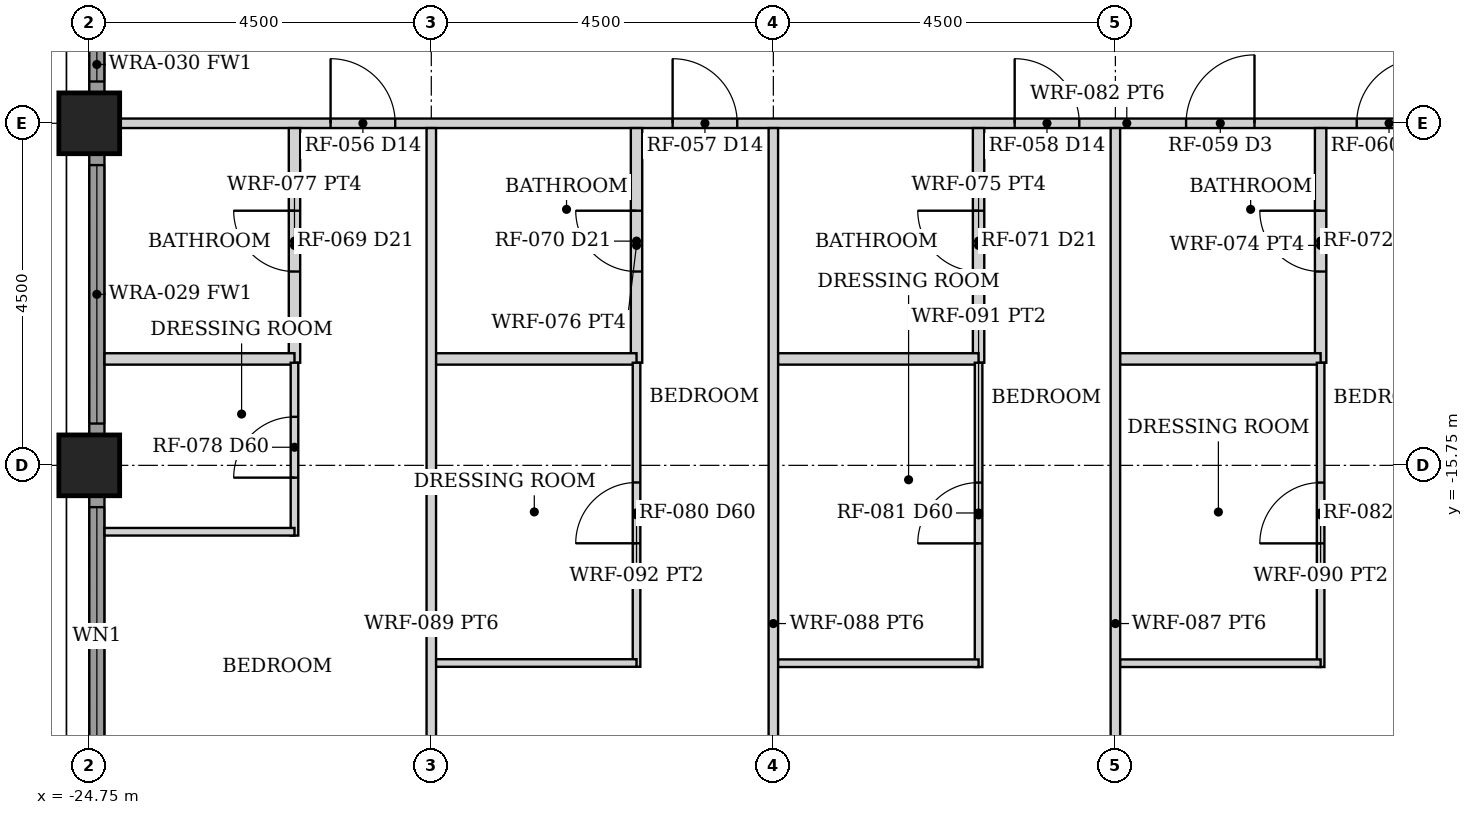
"""IFC4 building model, lengths in metres.
Left out: names, types, materials, properties, quantities, classifications, styles, units other than length and angle.
Written with IfcOpenShell. Run it as: python <this file> out.ifc"""

import sys

from ifc_helpers import new_model, si_unit, direction, frame, frame_2d, origin, origin_2d, place, context, subcontext, project, spatial, rectangle, hollow_rectangle, extrude, element, fill, save


model = new_model("IFC4")
c1 = context("Model", 3, precision=1e-05, world=origin(), true_north=direction((0.0, 1.0)))
c2 = subcontext(c1, "Body", "Model", "MODEL_VIEW")
j1 = project(units=[si_unit("LENGTHUNIT", "METRE"), si_unit("PLANEANGLEUNIT", "RADIAN")], contexts=[c1])
p1 = place(None, origin())
s1 = spatial("IfcSite", under=j1, at=p1, CompositionType="ELEMENT")
p2 = place(p1, origin())
s2 = spatial("IfcBuilding", under=s1, at=p2, CompositionType="ELEMENT")
p3 = place(p2, frame((0.0, 0.0, 79.0)))
s3 = spatial("IfcBuildingStorey", under=s2, at=p3, CompositionType="ELEMENT", Elevation=79.0)
for number, where, z_axis, x_axis in (
    (1, (-24.75, -15.75, 0.0), (0.0, 0.0, 1.0), (1.0, 0.0, 0.0)),
    (2, (-24.75, -11.25, 0.0), (0.0, 0.0, 1.0), (1.0, 0.0, 0.0)),
):
    element("IfcColumn", number, at=place(p3, frame(where, z_axis=z_axis, x_axis=x_axis)), inside=s3, PredefinedType="COLUMN", context=c2, shape_type="SweptSolid", body=[
        extrude(hollow_rectangle(XDim=0.8, YDim=0.8, WallThickness=0.06, at=origin_2d()), origin(), (0.0, 0.0, 1.0), 3.5),
    ])
p4 = place(p3, frame((-24.65, -19.845, 0.0), z_axis=(0.0, 0.0, 1.0), x_axis=(0.0, 1.0, 0.0)))
e3 = element("IfcWall", 3, at=p4, inside=s3, PredefinedType="SOLIDWALL", context=c2, shape_type="SweptSolid", body=[
    extrude(rectangle(XDim=3.69, YDim=0.2, at=frame_2d((1.845, 0.0))), origin(), (0.0, 0.0, 1.0), 2.379),
])
p5 = place(p4, frame((0.145, 0.0, 0.3)))
e4 = element("IfcOpeningElement", 4, at=p5, cuts=e3, PredefinedType="OPENING", context=c2, shape_type="SweptSolid", body=[
    extrude(rectangle(XDim=3.4, YDim=1.929, at=frame_2d((1.7, 0.964))), frame((0.0, 0.11, 0.0), z_axis=(0.0, -1.0, 0.0), x_axis=(1.0, 0.0, 0.0)), (0.0, 0.0, 1.0), 0.22),
])
p6 = place(p3, frame((-24.65, -15.345, 0.0), z_axis=(0.0, 0.0, 1.0), x_axis=(0.0, 1.0, 0.0)))
e5 = element("IfcWall", 5, at=p6, inside=s3, PredefinedType="SOLIDWALL", context=c2, shape_type="SweptSolid", body=[
    extrude(rectangle(XDim=3.69, YDim=0.2, at=frame_2d((1.845, 0.0))), origin(), (0.0, 0.0, 1.0), 2.379),
])
p7 = place(p6, frame((0.145, 0.0, 0.3)))
e6 = element("IfcOpeningElement", 6, at=p7, cuts=e5, PredefinedType="OPENING", context=c2, shape_type="SweptSolid", body=[
    extrude(rectangle(XDim=3.4, YDim=1.929, at=frame_2d((1.7, 0.964))), frame((0.0, 0.11, 0.0), z_axis=(0.0, -1.0, 0.0), x_axis=(1.0, 0.0, 0.0)), (0.0, 0.0, 1.0), 0.22),
])
p8 = place(p3, frame((-24.65, -10.845, 0.0), z_axis=(0.0, 0.0, 1.0), x_axis=(0.0, 1.0, 0.0)))
e7 = element("IfcWall", 7, at=p8, inside=s3, PredefinedType="SOLIDWALL", context=c2, shape_type="SweptSolid", body=[
    extrude(rectangle(XDim=3.69, YDim=0.2, at=frame_2d((1.845, 0.0))), origin(), (0.0, 0.0, 1.0), 2.379),
])
p9 = place(p8, frame((0.145, 0.0, 0.3)))
e8 = element("IfcOpeningElement", 8, at=p9, cuts=e7, PredefinedType="OPENING", context=c2, shape_type="SweptSolid", body=[
    extrude(rectangle(XDim=3.4, YDim=1.929, at=frame_2d((1.7, 0.964))), frame((0.0, 0.11, 0.0), z_axis=(0.0, -1.0, 0.0), x_axis=(1.0, 0.0, 0.0)), (0.0, 0.0, 1.0), 0.22),
])
p10 = place(p3, frame((-24.35, -11.25, 0.0), z_axis=(0.0, 0.0, 1.0), x_axis=(1.0, 0.0, 0.0)))
e9 = element("IfcWall", 9, at=p10, inside=s3, PredefinedType="PARTITIONING", context=c2, shape_type="SweptSolid", body=[
    extrude(rectangle(XDim=26.5, YDim=0.125, at=frame_2d((13.25, 0.0))), origin(), (0.0, 0.0, 1.0), 2.373),
])
p11 = place(p10, frame((24.75, 0.0, 0.0)))
e10 = element("IfcOpeningElement", 10, at=p11, cuts=e9, PredefinedType="OPENING", context=c2, shape_type="SweptSolid", body=[
    extrude(rectangle(XDim=0.9, YDim=2.1, at=frame_2d((0.45, 1.05))), frame((0.0, 0.073, 0.0), z_axis=(0.0, -1.0, 0.0), x_axis=(1.0, 0.0, 0.0)), (0.0, 0.0, 1.0), 0.145),
])
p12 = place(p10, frame((19.15, 0.0, 0.0)))
e11 = element("IfcOpeningElement", 11, at=p12, cuts=e9, PredefinedType="OPENING", context=c2, shape_type="SweptSolid", body=[
    extrude(rectangle(XDim=1.4, YDim=2.1, at=frame_2d((0.7, 1.05))), frame((0.0, 0.073, 0.0), z_axis=(0.0, -1.0, 0.0), x_axis=(1.0, 0.0, 0.0)), (0.0, 0.0, 1.0), 0.145),
])
p13 = place(p10, frame((16.275, 0.0, 0.0)))
e12 = element("IfcOpeningElement", 12, at=p13, cuts=e9, PredefinedType="OPENING", context=c2, shape_type="SweptSolid", body=[
    extrude(rectangle(XDim=0.85, YDim=2.1, at=frame_2d((0.425, 1.05))), frame((0.0, 0.073, 0.0), z_axis=(0.0, -1.0, 0.0), x_axis=(1.0, 0.0, 0.0)), (0.0, 0.0, 1.0), 0.145),
])
p14 = place(p10, frame((14.03, 0.0, 0.0)))
e13 = element("IfcOpeningElement", 13, at=p14, cuts=e9, PredefinedType="OPENING", context=c2, shape_type="SweptSolid", body=[
    extrude(rectangle(XDim=0.9, YDim=2.1, at=frame_2d((0.45, 1.05))), frame((0.0, 0.073, 0.0), z_axis=(0.0, -1.0, 0.0), x_axis=(1.0, 0.0, 0.0)), (0.0, 0.0, 1.0), 0.145),
])
p15 = place(p10, frame((11.775, 0.0, 0.0)))
e14 = element("IfcOpeningElement", 14, at=p15, cuts=e9, PredefinedType="OPENING", context=c2, shape_type="SweptSolid", body=[
    extrude(rectangle(XDim=0.85, YDim=2.1, at=frame_2d((0.425, 1.05))), frame((0.0, 0.073, 0.0), z_axis=(0.0, -1.0, 0.0), x_axis=(1.0, 0.0, 0.0)), (0.0, 0.0, 1.0), 0.145),
])
p16 = place(p10, frame((7.275, 0.0, 0.0)))
e15 = element("IfcOpeningElement", 15, at=p16, cuts=e9, PredefinedType="OPENING", context=c2, shape_type="SweptSolid", body=[
    extrude(rectangle(XDim=0.85, YDim=2.1, at=frame_2d((0.425, 1.05))), frame((0.0, 0.073, 0.0), z_axis=(0.0, -1.0, 0.0), x_axis=(1.0, 0.0, 0.0)), (0.0, 0.0, 1.0), 0.145),
])
p17 = place(p10, frame((2.775, 0.0, 0.0)))
e16 = element("IfcOpeningElement", 16, at=p17, cuts=e9, PredefinedType="OPENING", context=c2, shape_type="SweptSolid", body=[
    extrude(rectangle(XDim=0.85, YDim=2.1, at=frame_2d((0.425, 1.05))), frame((0.0, 0.073, 0.0), z_axis=(0.0, -1.0, 0.0), x_axis=(1.0, 0.0, 0.0)), (0.0, 0.0, 1.0), 0.145),
])
p18 = place(p3, frame((-8.55, -14.4, 0.0), z_axis=(0.0, 0.0, 1.0), x_axis=(0.0, 1.0, 0.0)))
e17 = element("IfcWall", 17, at=p18, inside=s3, PredefinedType="PARTITIONING", context=c2, shape_type="SweptSolid", body=[
    extrude(rectangle(XDim=3.087, YDim=0.15, at=frame_2d((1.544, 0.0))), origin(), (0.0, 0.0, 1.0), 2.373),
])
p19 = place(p18, frame((1.2, 0.0, 0.0)))
e18 = element("IfcOpeningElement", 18, at=p19, cuts=e17, PredefinedType="OPENING", context=c2, shape_type="SweptSolid", body=[
    extrude(rectangle(XDim=0.8, YDim=2.1, at=frame_2d((0.4, 1.05))), frame((0.0, 0.085, 0.0), z_axis=(0.0, -1.0, 0.0), x_axis=(1.0, 0.0, 0.0)), (0.0, 0.0, 1.0), 0.17),
])
p20 = place(p3, frame((-11.19, -14.35, 0.0), z_axis=(0.0, 0.0, 1.0), x_axis=(1.0, 0.0, 0.0)))
e19 = element("IfcWall", 19, at=p20, inside=s3, PredefinedType="PARTITIONING", context=c2, shape_type="SweptSolid", body=[
    extrude(rectangle(XDim=2.64, YDim=0.15, at=frame_2d((1.32, 0.0))), origin(), (0.0, 0.0, 1.0), 2.373),
])
p21 = place(p3, frame((-8.55, -18.403, 0.0), z_axis=(0.0, 0.0, 1.0), x_axis=(0.0, 1.0, 0.0)))
e20 = element("IfcWall", 20, at=p21, inside=s3, PredefinedType="PARTITIONING", context=c2, shape_type="SweptSolid", body=[
    extrude(rectangle(XDim=4.003, YDim=0.1, at=frame_2d((2.001, 0.0))), origin(), (0.0, 0.0, 1.0), 2.373),
])
p22 = place(p21, frame((1.627, 0.0, 0.0)))
e21 = element("IfcOpeningElement", 21, at=p22, cuts=e20, PredefinedType="OPENING", context=c2, shape_type="SweptSolid", body=[
    extrude(rectangle(XDim=0.8, YDim=2.1, at=frame_2d((0.4, 1.05))), frame((0.0, 0.06, 0.0), z_axis=(0.0, -1.0, 0.0), x_axis=(1.0, 0.0, 0.0)), (0.0, 0.0, 1.0), 0.12),
])
p23 = place(p3, frame((-11.19, -18.353, 0.0), z_axis=(0.0, 0.0, 1.0), x_axis=(1.0, 0.0, 0.0)))
e22 = element("IfcWall", 22, at=p23, inside=s3, PredefinedType="PARTITIONING", context=c2, shape_type="SweptSolid", body=[
    extrude(rectangle(XDim=2.64, YDim=0.1, at=frame_2d((1.32, 0.0))), origin(), (0.0, 0.0, 1.0), 2.373),
])
p24 = place(p3, frame((-11.25, -24.35, 0.0), z_axis=(0.0, 0.0, 1.0), x_axis=(0.0, 1.0, 0.0)))
e23 = element("IfcWall", 23, at=p24, inside=s3, PredefinedType="PARTITIONING", context=c2, shape_type="SweptSolid", body=[
    extrude(rectangle(XDim=13.038, YDim=0.125, at=frame_2d((6.519, 0.0))), origin(), (0.0, 0.0, 1.0), 2.373),
])
p25 = place(p3, frame((-13.05, -14.4, 0.0), z_axis=(0.0, 0.0, 1.0), x_axis=(0.0, 1.0, 0.0)))
e24 = element("IfcWall", 24, at=p25, inside=s3, PredefinedType="PARTITIONING", context=c2, shape_type="SweptSolid", body=[
    extrude(rectangle(XDim=3.087, YDim=0.15, at=frame_2d((1.544, 0.0))), origin(), (0.0, 0.0, 1.0), 2.373),
])
p26 = place(p25, frame((1.2, 0.0, 0.0)))
e25 = element("IfcOpeningElement", 25, at=p26, cuts=e24, PredefinedType="OPENING", context=c2, shape_type="SweptSolid", body=[
    extrude(rectangle(XDim=0.8, YDim=2.1, at=frame_2d((0.4, 1.05))), frame((0.0, 0.085, 0.0), z_axis=(0.0, -1.0, 0.0), x_axis=(1.0, 0.0, 0.0)), (0.0, 0.0, 1.0), 0.17),
])
p27 = place(p3, frame((-15.69, -14.35, 0.0), z_axis=(0.0, 0.0, 1.0), x_axis=(1.0, 0.0, 0.0)))
e26 = element("IfcWall", 26, at=p27, inside=s3, PredefinedType="PARTITIONING", context=c2, shape_type="SweptSolid", body=[
    extrude(rectangle(XDim=2.64, YDim=0.15, at=frame_2d((1.32, 0.0))), origin(), (0.0, 0.0, 1.0), 2.373),
])
p28 = place(p3, frame((-13.05, -18.403, 0.0), z_axis=(0.0, 0.0, 1.0), x_axis=(0.0, 1.0, 0.0)))
e27 = element("IfcWall", 27, at=p28, inside=s3, PredefinedType="PARTITIONING", context=c2, shape_type="SweptSolid", body=[
    extrude(rectangle(XDim=4.003, YDim=0.1, at=frame_2d((2.001, 0.0))), origin(), (0.0, 0.0, 1.0), 2.373),
])
p29 = place(p28, frame((1.627, 0.0, 0.0)))
e28 = element("IfcOpeningElement", 28, at=p29, cuts=e27, PredefinedType="OPENING", context=c2, shape_type="SweptSolid", body=[
    extrude(rectangle(XDim=0.8, YDim=2.1, at=frame_2d((0.4, 1.05))), frame((0.0, 0.06, 0.0), z_axis=(0.0, -1.0, 0.0), x_axis=(1.0, 0.0, 0.0)), (0.0, 0.0, 1.0), 0.12),
])
p30 = place(p3, frame((-15.69, -18.353, 0.0), z_axis=(0.0, 0.0, 1.0), x_axis=(1.0, 0.0, 0.0)))
e29 = element("IfcWall", 29, at=p30, inside=s3, PredefinedType="PARTITIONING", context=c2, shape_type="SweptSolid", body=[
    extrude(rectangle(XDim=2.64, YDim=0.1, at=frame_2d((1.32, 0.0))), origin(), (0.0, 0.0, 1.0), 2.373),
])
p31 = place(p3, frame((-15.75, -24.35, 0.0), z_axis=(0.0, 0.0, 1.0), x_axis=(0.0, 1.0, 0.0)))
e30 = element("IfcWall", 30, at=p31, inside=s3, PredefinedType="PARTITIONING", context=c2, shape_type="SweptSolid", body=[
    extrude(rectangle(XDim=13.038, YDim=0.125, at=frame_2d((6.519, 0.0))), origin(), (0.0, 0.0, 1.0), 2.373),
])
p32 = place(p3, frame((-17.55, -14.4, 0.0), z_axis=(0.0, 0.0, 1.0), x_axis=(0.0, 1.0, 0.0)))
e31 = element("IfcWall", 31, at=p32, inside=s3, PredefinedType="PARTITIONING", context=c2, shape_type="SweptSolid", body=[
    extrude(rectangle(XDim=3.087, YDim=0.15, at=frame_2d((1.544, 0.0))), origin(), (0.0, 0.0, 1.0), 2.373),
])
p33 = place(p32, frame((1.2, 0.0, 0.0)))
e32 = element("IfcOpeningElement", 32, at=p33, cuts=e31, PredefinedType="OPENING", context=c2, shape_type="SweptSolid", body=[
    extrude(rectangle(XDim=0.8, YDim=2.1, at=frame_2d((0.4, 1.05))), frame((0.0, 0.085, 0.0), z_axis=(0.0, -1.0, 0.0), x_axis=(1.0, 0.0, 0.0)), (0.0, 0.0, 1.0), 0.17),
])
p34 = place(p3, frame((-20.19, -14.35, 0.0), z_axis=(0.0, 0.0, 1.0), x_axis=(1.0, 0.0, 0.0)))
e33 = element("IfcWall", 33, at=p34, inside=s3, PredefinedType="PARTITIONING", context=c2, shape_type="SweptSolid", body=[
    extrude(rectangle(XDim=2.64, YDim=0.15, at=frame_2d((1.32, 0.0))), origin(), (0.0, 0.0, 1.0), 2.373),
])
p35 = place(p3, frame((-17.55, -18.4, 0.0), z_axis=(0.0, 0.0, 1.0), x_axis=(0.0, 1.0, 0.0)))
e34 = element("IfcWall", 34, at=p35, inside=s3, PredefinedType="PARTITIONING", context=c2, shape_type="SweptSolid", body=[
    extrude(rectangle(XDim=4.0, YDim=0.1, at=frame_2d((2.0, 0.0))), origin(), (0.0, 0.0, 1.0), 2.373),
])
p36 = place(p35, frame((1.625, 0.0, 0.0)))
e35 = element("IfcOpeningElement", 35, at=p36, cuts=e34, PredefinedType="OPENING", context=c2, shape_type="SweptSolid", body=[
    extrude(rectangle(XDim=0.8, YDim=2.1, at=frame_2d((0.4, 1.05))), frame((0.0, 0.06, 0.0), z_axis=(0.0, -1.0, 0.0), x_axis=(1.0, 0.0, 0.0)), (0.0, 0.0, 1.0), 0.12),
])
p37 = place(p3, frame((-20.19, -18.35, 0.0), z_axis=(0.0, 0.0, 1.0), x_axis=(1.0, 0.0, 0.0)))
e36 = element("IfcWall", 36, at=p37, inside=s3, PredefinedType="PARTITIONING", context=c2, shape_type="SweptSolid", body=[
    extrude(rectangle(XDim=2.64, YDim=0.1, at=frame_2d((1.32, 0.0))), origin(), (0.0, 0.0, 1.0), 2.373),
])
p38 = place(p3, frame((-20.25, -24.35, 0.0), z_axis=(0.0, 0.0, 1.0), x_axis=(0.0, 1.0, 0.0)))
e37 = element("IfcWall", 37, at=p38, inside=s3, PredefinedType="PARTITIONING", context=c2, shape_type="SweptSolid", body=[
    extrude(rectangle(XDim=13.038, YDim=0.125, at=frame_2d((6.519, 0.0))), origin(), (0.0, 0.0, 1.0), 2.373),
])
p39 = place(p3, frame((-22.05, -14.4, 0.0), z_axis=(0.0, 0.0, 1.0), x_axis=(0.0, 1.0, 0.0)))
e38 = element("IfcWall", 38, at=p39, inside=s3, PredefinedType="PARTITIONING", context=c2, shape_type="SweptSolid", body=[
    extrude(rectangle(XDim=3.087, YDim=0.15, at=frame_2d((1.544, 0.0))), origin(), (0.0, 0.0, 1.0), 2.373),
])
p40 = place(p39, frame((1.2, 0.0, 0.0)))
e39 = element("IfcOpeningElement", 39, at=p40, cuts=e38, PredefinedType="OPENING", context=c2, shape_type="SweptSolid", body=[
    extrude(rectangle(XDim=0.8, YDim=2.1, at=frame_2d((0.4, 1.05))), frame((0.0, 0.085, 0.0), z_axis=(0.0, -1.0, 0.0), x_axis=(1.0, 0.0, 0.0)), (0.0, 0.0, 1.0), 0.17),
])
p41 = place(p3, frame((-24.55, -14.35, 0.0), z_axis=(0.0, 0.0, 1.0), x_axis=(1.0, 0.0, 0.0)))
e40 = element("IfcWall", 40, at=p41, inside=s3, PredefinedType="PARTITIONING", context=c2, shape_type="SweptSolid", body=[
    extrude(rectangle(XDim=2.5, YDim=0.15, at=frame_2d((1.25, 0.0))), origin(), (0.0, 0.0, 1.0), 2.373),
])
p42 = place(p3, frame((-22.05, -16.674, 0.0), z_axis=(0.0, 0.0, 1.0), x_axis=(0.0, 1.0, 0.0)))
e41 = element("IfcWall", 41, at=p42, inside=s3, PredefinedType="PARTITIONING", context=c2, shape_type="SweptSolid", body=[
    extrude(rectangle(XDim=2.274, YDim=0.1, at=frame_2d((1.137, 0.0))), origin(), (0.0, 0.0, 1.0), 2.373),
])
p43 = place(p42, frame((0.762, 0.0, 0.0)))
e42 = element("IfcOpeningElement", 42, at=p43, cuts=e41, PredefinedType="OPENING", context=c2, shape_type="SweptSolid", body=[
    extrude(rectangle(XDim=0.8, YDim=2.1, at=frame_2d((0.4, 1.05))), frame((0.0, 0.06, 0.0), z_axis=(0.0, -1.0, 0.0), x_axis=(1.0, 0.0, 0.0)), (0.0, 0.0, 1.0), 0.12),
])
p44 = place(p3, frame((-24.55, -16.624, 0.0), z_axis=(0.0, 0.0, 1.0), x_axis=(1.0, 0.0, 0.0)))
e43 = element("IfcWall", 43, at=p44, inside=s3, PredefinedType="PARTITIONING", context=c2, shape_type="SweptSolid", body=[
    extrude(rectangle(XDim=2.5, YDim=0.1, at=frame_2d((1.25, 0.0))), origin(), (0.0, 0.0, 1.0), 2.373),
])
p45 = place(p5, origin())
e44 = element("IfcWindow", 44, at=p45, inside=s3, PartitioningType="SINGLE_PANEL", PredefinedType="WINDOW", context=c2, shape_type="SweptSolid", body=[
    extrude(rectangle(XDim=3.4, YDim=1.929, at=frame_2d((1.7, 0.964))), frame((0.0, 0.03, 0.0), z_axis=(0.0, -1.0, 0.0), x_axis=(1.0, 0.0, 0.0)), (0.0, 0.0, 1.0), 0.06),
])
fill(e4, e44)
p46 = place(p7, origin())
e45 = element("IfcWindow", 45, at=p46, inside=s3, PartitioningType="SINGLE_PANEL", PredefinedType="WINDOW", context=c2, shape_type="SweptSolid", body=[
    extrude(rectangle(XDim=3.4, YDim=1.929, at=frame_2d((1.7, 0.964))), frame((0.0, 0.03, 0.0), z_axis=(0.0, -1.0, 0.0), x_axis=(1.0, 0.0, 0.0)), (0.0, 0.0, 1.0), 0.06),
])
fill(e6, e45)
p47 = place(p9, origin())
e46 = element("IfcWindow", 46, at=p47, inside=s3, PartitioningType="SINGLE_PANEL", PredefinedType="WINDOW", context=c2, shape_type="SweptSolid", body=[
    extrude(rectangle(XDim=3.4, YDim=1.929, at=frame_2d((1.7, 0.964))), frame((0.0, 0.03, 0.0), z_axis=(0.0, -1.0, 0.0), x_axis=(1.0, 0.0, 0.0)), (0.0, 0.0, 1.0), 0.06),
])
fill(e8, e46)
p48 = place(p13, origin())
e47 = element("IfcDoor", 47, at=p48, inside=s3, OperationType="SINGLE_SWING_RIGHT", PredefinedType="DOOR", context=c2, shape_type="SweptSolid", body=[
    extrude(rectangle(XDim=0.85, YDim=2.1, at=frame_2d((0.425, 1.05))), frame((0.0, 0.025, 0.0), z_axis=(0.0, -1.0, 0.0), x_axis=(1.0, 0.0, 0.0)), (0.0, 0.0, 1.0), 0.05),
])
fill(e12, e47)
p49 = place(p19, origin())
e48 = element("IfcDoor", 48, at=p49, inside=s3, OperationType="SINGLE_SWING_RIGHT", PredefinedType="DOOR", context=c2, shape_type="SweptSolid", body=[
    extrude(rectangle(XDim=0.8, YDim=2.1, at=frame_2d((0.4, 1.05))), frame((0.0, 0.025, 0.0), z_axis=(0.0, -1.0, 0.0), x_axis=(1.0, 0.0, 0.0)), (0.0, 0.0, 1.0), 0.05),
])
fill(e18, e48)
p50 = place(p14, origin())
e49 = element("IfcDoor", 49, at=p50, inside=s3, OperationType="SINGLE_SWING_RIGHT", PredefinedType="DOOR", context=c2, shape_type="SweptSolid", body=[
    extrude(rectangle(XDim=0.9, YDim=2.1, at=frame_2d((0.45, 1.05))), frame((0.0, 0.025, 0.0), z_axis=(0.0, -1.0, 0.0), x_axis=(1.0, 0.0, 0.0)), (0.0, 0.0, 1.0), 0.05),
])
fill(e13, e49)
p51 = place(p22, origin())
e50 = element("IfcDoor", 50, at=p51, inside=s3, OperationType="SINGLE_SWING_LEFT", PredefinedType="DOOR", context=c2, shape_type="SweptSolid", body=[
    extrude(rectangle(XDim=0.8, YDim=2.1, at=frame_2d((0.4, 1.05))), frame((0.0, 0.025, 0.0), z_axis=(0.0, -1.0, 0.0), x_axis=(1.0, 0.0, 0.0)), (0.0, 0.0, 1.0), 0.05),
])
fill(e21, e50)
p52 = place(p15, origin())
e51 = element("IfcDoor", 51, at=p52, inside=s3, OperationType="SINGLE_SWING_LEFT", PredefinedType="DOOR", context=c2, shape_type="SweptSolid", body=[
    extrude(rectangle(XDim=0.85, YDim=2.1, at=frame_2d((0.425, 1.05))), frame((0.0, 0.025, 0.0), z_axis=(0.0, -1.0, 0.0), x_axis=(1.0, 0.0, 0.0)), (0.0, 0.0, 1.0), 0.05),
])
fill(e14, e51)
p53 = place(p26, origin())
e52 = element("IfcDoor", 52, at=p53, inside=s3, OperationType="SINGLE_SWING_RIGHT", PredefinedType="DOOR", context=c2, shape_type="SweptSolid", body=[
    extrude(rectangle(XDim=0.8, YDim=2.1, at=frame_2d((0.4, 1.05))), frame((0.0, 0.025, 0.0), z_axis=(0.0, -1.0, 0.0), x_axis=(1.0, 0.0, 0.0)), (0.0, 0.0, 1.0), 0.05),
])
fill(e25, e52)
p54 = place(p29, origin())
e53 = element("IfcDoor", 53, at=p54, inside=s3, OperationType="SINGLE_SWING_LEFT", PredefinedType="DOOR", context=c2, shape_type="SweptSolid", body=[
    extrude(rectangle(XDim=0.8, YDim=2.1, at=frame_2d((0.4, 1.05))), frame((0.0, 0.025, 0.0), z_axis=(0.0, -1.0, 0.0), x_axis=(1.0, 0.0, 0.0)), (0.0, 0.0, 1.0), 0.05),
])
fill(e28, e53)
p55 = place(p16, origin())
e54 = element("IfcDoor", 54, at=p55, inside=s3, OperationType="SINGLE_SWING_LEFT", PredefinedType="DOOR", context=c2, shape_type="SweptSolid", body=[
    extrude(rectangle(XDim=0.85, YDim=2.1, at=frame_2d((0.425, 1.05))), frame((0.0, 0.025, 0.0), z_axis=(0.0, -1.0, 0.0), x_axis=(1.0, 0.0, 0.0)), (0.0, 0.0, 1.0), 0.05),
])
fill(e15, e54)
p56 = place(p33, origin())
e55 = element("IfcDoor", 55, at=p56, inside=s3, OperationType="SINGLE_SWING_RIGHT", PredefinedType="DOOR", context=c2, shape_type="SweptSolid", body=[
    extrude(rectangle(XDim=0.8, YDim=2.1, at=frame_2d((0.4, 1.05))), frame((0.0, 0.025, 0.0), z_axis=(0.0, -1.0, 0.0), x_axis=(1.0, 0.0, 0.0)), (0.0, 0.0, 1.0), 0.05),
])
fill(e32, e55)
p57 = place(p36, origin())
e56 = element("IfcDoor", 56, at=p57, inside=s3, OperationType="SINGLE_SWING_LEFT", PredefinedType="DOOR", context=c2, shape_type="SweptSolid", body=[
    extrude(rectangle(XDim=0.8, YDim=2.1, at=frame_2d((0.4, 1.05))), frame((0.0, 0.025, 0.0), z_axis=(0.0, -1.0, 0.0), x_axis=(1.0, 0.0, 0.0)), (0.0, 0.0, 1.0), 0.05),
])
fill(e35, e56)
p58 = place(p17, origin())
e57 = element("IfcDoor", 57, at=p58, inside=s3, OperationType="SINGLE_SWING_LEFT", PredefinedType="DOOR", context=c2, shape_type="SweptSolid", body=[
    extrude(rectangle(XDim=0.85, YDim=2.1, at=frame_2d((0.425, 1.05))), frame((0.0, 0.025, 0.0), z_axis=(0.0, -1.0, 0.0), x_axis=(1.0, 0.0, 0.0)), (0.0, 0.0, 1.0), 0.05),
])
fill(e16, e57)
p59 = place(p40, origin())
e58 = element("IfcDoor", 58, at=p59, inside=s3, OperationType="SINGLE_SWING_RIGHT", PredefinedType="DOOR", context=c2, shape_type="SweptSolid", body=[
    extrude(rectangle(XDim=0.8, YDim=2.1, at=frame_2d((0.4, 1.05))), frame((0.0, 0.025, 0.0), z_axis=(0.0, -1.0, 0.0), x_axis=(1.0, 0.0, 0.0)), (0.0, 0.0, 1.0), 0.05),
])
fill(e39, e58)
p60 = place(p43, origin())
e59 = element("IfcDoor", 59, at=p60, inside=s3, OperationType="SINGLE_SWING_LEFT", PredefinedType="DOOR", context=c2, shape_type="SweptSolid", body=[
    extrude(rectangle(XDim=0.8, YDim=2.1, at=frame_2d((0.4, 1.05))), frame((0.0, 0.025, 0.0), z_axis=(0.0, -1.0, 0.0), x_axis=(1.0, 0.0, 0.0)), (0.0, 0.0, 1.0), 0.05),
])
fill(e42, e59)
save(model, sys.argv[1])
